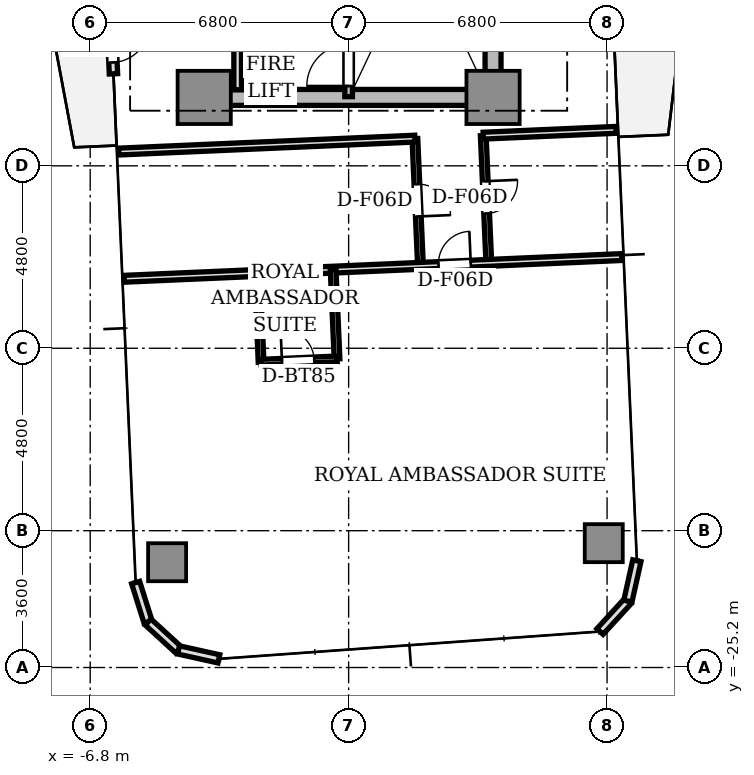
"""IFC4 building model, lengths in metres.
Left out: names, types, materials, properties, quantities, classifications, styles, units other than length and angle.
Written with IfcOpenShell. Run it as: python <this file> out.ifc"""

import sys

from ifc_helpers import new_model, si_unit, direction, frame, frame_2d, origin, origin_2d, place, context, subcontext, project, spatial, rectangle, extrude, source, transform, mapped, element, fill, save


model = new_model("IFC4")
c1 = context("Model", 3, precision=1e-05, world=origin(), true_north=direction((0.0, 1.0)))
c2 = subcontext(c1, "Body", "Model", "MODEL_VIEW")
j1 = project(units=[si_unit("LENGTHUNIT", "METRE"), si_unit("PLANEANGLEUNIT", "RADIAN")], contexts=[c1])
p1 = place(None, origin())
s1 = spatial("IfcSite", under=j1, at=p1, CompositionType="ELEMENT")
p2 = place(p1, origin())
s2 = spatial("IfcBuilding", under=s1, at=p2, CompositionType="ELEMENT")
p3 = place(p2, frame((0.0, 0.0, 118.15)))
s3 = spatial("IfcBuildingStorey", under=s2, at=p3, CompositionType="ELEMENT", Elevation=118.15)
p4 = place(p3, frame((-3.55, -10.2, 0.0), z_axis=(0.0, 0.0, 1.0), x_axis=(1.0, 0.0, 0.0)))
e1 = element("IfcWall", 1, at=p4, inside=s3, PredefinedType="SHEAR", context=c2, shape_type="SweptSolid", body=[
    extrude(rectangle(XDim=7.1, YDim=0.42, at=frame_2d((3.55, 0.0))), origin(), (0.0, 0.0, 1.0), 3.11),
])
p5 = place(p3, frame((3.8, -9.75, 0.0), z_axis=(0.0, 0.0, 1.0), x_axis=(0.0, 1.0, 0.0)))
e2 = element("IfcWall", 2, at=p5, inside=s3, PredefinedType="SHEAR", context=c2, shape_type="SweptSolid", body=[
    extrude(rectangle(XDim=6.9, YDim=0.42, at=frame_2d((3.45, 0.0))), origin(), (0.0, 0.0, 1.0), 3.11),
])
m1 = source(origin(), c2, "Body", "SweptSolid", [
    extrude(rectangle(XDim=1.4, YDim=1.4, at=origin_2d()), origin(), (0.0, 0.0, 1.0), 3.11),
])
for number, where, z_axis, x_axis in (
    (3, (-3.8, -10.2, 0.0), (0.0, 0.0, 1.0), (1.0, 0.0, 0.0)),
    (4, (3.8, -10.2, 0.0), (0.0, 0.0, 1.0), (1.0, 0.0, 0.0)),
):
    element("IfcColumn", number, at=place(p3, frame(where, z_axis=z_axis, x_axis=x_axis)), inside=s3, PredefinedType="COLUMN", context=c2, shape_type="MappedRepresentation", body=[
        mapped(m1, transform((0.0, 0.0, 0.0), scale=1.0)),
    ])
m2 = source(origin(), c2, "Body", "SweptSolid", [
    extrude(rectangle(XDim=1.0, YDim=1.0, at=origin_2d()), origin(), (0.0, 0.0, 1.0), 3.11),
])
for number, where, z_axis, x_axis in (
    (5, (-4.776, -22.43, 0.0), (0.0, 0.0, 1.0), (1.0, 0.0, 0.0)),
    (6, (6.713, -21.928, 0.0), (0.0, 0.0, 1.0), (1.0, 0.0, 0.0)),
):
    element("IfcColumn", number, at=place(p3, frame(where, z_axis=z_axis, x_axis=x_axis)), inside=s3, PredefinedType="COLUMN", context=c2, shape_type="MappedRepresentation", body=[
        mapped(m2, transform((0.0, 0.0, 0.0), scale=1.0)),
    ])
p6 = place(p3, frame((-6.306, -6.882, 0.0), z_axis=(0.0, 0.0, 1.0), x_axis=(0.043672655174, -0.999045894436, 0.0)))
e7 = element("IfcWall", 7, at=p6, inside=s3, PredefinedType="STANDARD", context=c2, shape_type="SweptSolid", body=[
    extrude(rectangle(XDim=2.7, YDim=0.22, at=frame_2d((1.35, 0.0))), origin(), (0.0, 0.0, 1.0), 3.11),
])
p7 = place(p6, frame((1.4, 0.0, 0.0)))
e8 = element("IfcOpeningElement", 8, at=p7, cuts=e7, PredefinedType="OPENING", context=c2, shape_type="SweptSolid", body=[
    extrude(rectangle(XDim=1.0, YDim=2.2, at=frame_2d((0.5, 1.1))), frame((0.0, 0.12, 0.0), z_axis=(0.0, -1.0, 0.0), x_axis=(1.0, 0.0, 0.0)), (0.0, 0.0, 1.0), 0.24),
])
p8 = place(p3, frame((-5.604, -22.966, 0.0), z_axis=(0.0, 0.0, 1.0), x_axis=(0.300755105707, -0.953701403161, 0.0)))
e9 = element("IfcWall", 9, at=p8, inside=s3, PredefinedType="STANDARD", context=c2, shape_type="SweptSolid", body=[
    extrude(rectangle(XDim=1.087, YDim=0.22, at=frame_2d((0.543, 0.0))), origin(), (0.0, 0.0, 1.0), 3.11),
])
p9 = place(p3, frame((-5.277, -24.003, 0.0), z_axis=(0.0, 0.0, 1.0), x_axis=(0.737312600672, -0.675551721847, 0.0)))
e10 = element("IfcWall", 10, at=p9, inside=s3, PredefinedType="STANDARD", context=c2, shape_type="SweptSolid", body=[
    extrude(rectangle(XDim=1.087, YDim=0.22, at=frame_2d((0.543, 0.0))), origin(), (0.0, 0.0, 1.0), 3.11),
])
for number, where, z_axis, x_axis in (
    (11, (-4.475, -24.737, 0.0), (0.0, 0.0, 1.0), (0.976, -0.217, 0.0)),
    (12, (6.614, -24.253, 0.0), (0.0, 0.0, 1.0), (0.676, 0.737, 0.0)),
):
    element("IfcWall", number, at=place(p3, frame(where, z_axis=z_axis, x_axis=x_axis)), inside=s3, PredefinedType="STANDARD", context=c2, shape_type="SweptSolid", body=[
        extrude(rectangle(XDim=1.087, YDim=0.22, at=frame_2d((0.543, 0.0))), origin(), (0.0, 0.0, 1.0), 3.11),
    ])
p10 = place(p3, frame((7.349, -23.452, 0.0), z_axis=(0.0, 0.0, 1.0), x_axis=(0.216454939174, 0.976292609471, 0.0)))
e13 = element("IfcWall", 13, at=p10, inside=s3, PredefinedType="STANDARD", context=c2, shape_type="SweptSolid", body=[
    extrude(rectangle(XDim=1.087, YDim=0.22, at=frame_2d((0.544, 0.0))), origin(), (0.0, 0.0, 1.0), 3.11),
])
p11 = place(p3, frame((0.0, -10.18, 0.0), z_axis=(0.0, 0.0, 1.0), x_axis=(0.0, 1.0, 0.0)))
e14 = element("IfcWall", 14, at=p11, inside=s3, PredefinedType="SOLIDWALL", context=c2, shape_type="SweptSolid", body=[
    extrude(rectangle(XDim=7.68, YDim=0.2, at=frame_2d((3.84, 0.0))), origin(), (0.0, 0.0, 1.0), 3.11),
])
p12 = place(p11, frame((0.28, 0.0, 0.0)))
e15 = element("IfcOpeningElement", 15, at=p12, cuts=e14, PredefinedType="OPENING", context=c2, shape_type="SweptSolid", body=[
    extrude(rectangle(XDim=1.1, YDim=2.15, at=frame_2d((0.55, 1.075))), frame((0.0, 0.11, 0.0), z_axis=(0.0, -1.0, 0.0), x_axis=(1.0, 0.0, 0.0)), (0.0, 0.0, 1.0), 0.22),
])
p13 = place(p3, frame((-2.92, -10.0, 0.0), z_axis=(0.0, 0.0, 1.0), x_axis=(0.0, 1.0, 0.0)))
e16 = element("IfcWall", 16, at=p13, inside=s3, PredefinedType="SOLIDWALL", context=c2, shape_type="SweptSolid", body=[
    extrude(rectangle(XDim=1.44, YDim=0.2, at=frame_2d((0.72, 0.0))), origin(), (0.0, 0.0, 1.0), 2.66),
])
p14 = place(p3, frame((3.542, -11.206, 0.0), z_axis=(0.0, 0.0, 1.0), x_axis=(0.043582710367, -0.99904982226, 0.0)))
e17 = element("IfcWall", 17, at=p14, inside=s3, PredefinedType="PARTITIONING", context=c2, shape_type="SweptSolid", body=[
    extrude(rectangle(XDim=3.35, YDim=0.15, at=frame_2d((1.675, 0.0))), origin(), (0.0, 0.0, 1.0), 2.66),
])
p15 = place(p14, frame((1.2, 0.0, 0.0)))
e18 = element("IfcOpeningElement", 18, at=p15, cuts=e17, PredefinedType="OPENING", context=c2, shape_type="SweptSolid", body=[
    extrude(rectangle(XDim=0.85, YDim=2.1, at=frame_2d((0.425, 1.05))), frame((0.0, 0.085, 0.0), z_axis=(0.0, -1.0, 0.0), x_axis=(1.0, 0.0, 0.0)), (0.0, 0.0, 1.0), 0.17),
])
p16 = place(p3, frame((1.744, -11.285, 0.0), z_axis=(0.0, 0.0, 1.0), x_axis=(0.043579537274, -0.999049960678, 0.0)))
e19 = element("IfcWall", 19, at=p16, inside=s3, PredefinedType="PARTITIONING", context=c2, shape_type="SweptSolid", body=[
    extrude(rectangle(XDim=3.35, YDim=0.15, at=frame_2d((1.675, 0.0))), origin(), (0.0, 0.0, 1.0), 2.66),
])
p17 = place(p16, frame((1.2, 0.0, 0.0)))
e20 = element("IfcOpeningElement", 20, at=p17, cuts=e19, PredefinedType="OPENING", context=c2, shape_type="SweptSolid", body=[
    extrude(rectangle(XDim=0.85, YDim=2.1, at=frame_2d((0.425, 1.05))), frame((0.0, 0.085, 0.0), z_axis=(0.0, -1.0, 0.0), x_axis=(1.0, 0.0, 0.0)), (0.0, 0.0, 1.0), 0.17),
])
p18 = place(p3, frame((3.542, -11.206, 0.0), z_axis=(0.0, 0.0, 1.0), x_axis=(0.999046129111, 0.04366728647, 0.0)))
e21 = element("IfcWall", 21, at=p18, inside=s3, PredefinedType="PARTITIONING", context=c2, shape_type="SweptSolid", body=[
    extrude(rectangle(XDim=3.5, YDim=0.18, at=frame_2d((1.75, 0.0))), origin(), (0.0, 0.0, 1.0), 2.66),
])
p19 = place(p3, frame((-6.049, -11.625, 0.0), z_axis=(0.0, 0.0, 1.0), x_axis=(0.999047634936, 0.043632821702, 0.0)))
e22 = element("IfcWall", 22, at=p19, inside=s3, PredefinedType="PARTITIONING", context=c2, shape_type="SweptSolid", body=[
    extrude(rectangle(XDim=7.8, YDim=0.18, at=frame_2d((3.9, 0.0))), origin(), (0.0, 0.0, 1.0), 2.66),
])
p20 = place(p3, frame((-5.903, -14.972, 0.0), z_axis=(0.0, 0.0, 1.0), x_axis=(0.999048653727, 0.043609488494, 0.0)))
e23 = element("IfcWall", 23, at=p20, inside=s3, PredefinedType="PARTITIONING", context=c2, shape_type="SweptSolid", body=[
    extrude(rectangle(XDim=13.1, YDim=0.18, at=frame_2d((6.55, 0.0))), origin(), (0.0, 0.0, 1.0), 2.66),
])
p21 = place(p20, frame((8.275, 0.0, 0.0)))
e24 = element("IfcOpeningElement", 24, at=p21, cuts=e23, PredefinedType="OPENING", context=c2, shape_type="SweptSolid", body=[
    extrude(rectangle(XDim=0.85, YDim=2.1, at=frame_2d((0.425, 1.05))), frame((0.0, 0.1, 0.0), z_axis=(0.0, -1.0, 0.0), x_axis=(1.0, 0.0, 0.0)), (0.0, 0.0, 1.0), 0.2),
])
p22 = place(p3, frame((-0.408, -14.732, 0.0), z_axis=(0.0, 0.0, 1.0), x_axis=(0.043527387554, -0.999052234136, 0.0)))
e25 = element("IfcWall", 25, at=p22, inside=s3, PredefinedType="PARTITIONING", context=c2, shape_type="SweptSolid", body=[
    extrude(rectangle(XDim=2.35, YDim=0.15, at=frame_2d((1.175, 0.0))), origin(), (0.0, 0.0, 1.0), 2.66),
])
p23 = place(p3, frame((-2.406, -14.819, 0.0), z_axis=(0.0, 0.0, 1.0), x_axis=(0.04363560271, -0.999047513473, 0.0)))
e26 = element("IfcWall", 26, at=p23, inside=s3, PredefinedType="PARTITIONING", context=c2, shape_type="SweptSolid", body=[
    extrude(rectangle(XDim=2.35, YDim=0.15, at=frame_2d((1.175, 0.0))), origin(), (0.0, 0.0, 1.0), 2.66),
])
p24 = place(p3, frame((-2.303, -17.167, 0.0), z_axis=(0.0, 0.0, 1.0), x_axis=(0.999049929275, 0.043580257179, 0.0)))
e27 = element("IfcWall", 27, at=p24, inside=s3, PredefinedType="PARTITIONING", context=c2, shape_type="SweptSolid", body=[
    extrude(rectangle(XDim=2.0, YDim=0.15, at=frame_2d((1.0, 0.0))), origin(), (0.0, 0.0, 1.0), 2.66),
])
p25 = place(p24, frame((0.55, 0.0, 0.0)))
e28 = element("IfcOpeningElement", 28, at=p25, cuts=e27, PredefinedType="OPENING", context=c2, shape_type="SweptSolid", body=[
    extrude(rectangle(XDim=0.85, YDim=2.1, at=frame_2d((0.425, 1.05))), frame((0.0, 0.085, 0.0), z_axis=(0.0, -1.0, 0.0), x_axis=(1.0, 0.0, 0.0)), (0.0, 0.0, 1.0), 0.17),
])
m3 = source(origin(), c2, "Body", "SweptSolid", [
    extrude(rectangle(XDim=1.0, YDim=0.05, at=origin_2d()), origin(), (0.0, 0.0, 1.0), 2.2),
])
p26 = place(p7, frame((0.5, 0.0, 0.0)))
e29 = element("IfcDoor", 29, at=p26, inside=s3, OperationType="SINGLE_SWING_LEFT", PredefinedType="DOOR", context=c2, shape_type="MappedRepresentation", body=[
    mapped(m3, transform((0.0, 0.0, 0.0), scale=1.0)),
])
fill(e8, e29)
m4 = source(origin(), c2, "Body", "SweptSolid", [
    extrude(rectangle(XDim=1.1, YDim=0.05, at=origin_2d()), origin(), (0.0, 0.0, 1.0), 2.15),
])
p27 = place(p12, frame((0.55, 0.0, 0.0)))
e30 = element("IfcDoor", 30, at=p27, inside=s3, OperationType="SINGLE_SWING_LEFT", PredefinedType="DOOR", context=c2, shape_type="MappedRepresentation", body=[
    mapped(m4, transform((0.0, 0.0, 0.0), scale=1.0)),
])
fill(e15, e30)
m5 = source(origin(), c2, "Body", "SweptSolid", [
    extrude(rectangle(XDim=0.85, YDim=0.05, at=origin_2d()), origin(), (0.0, 0.0, 1.0), 2.1),
])
p28 = place(p15, frame((0.425, 0.0, 0.0)))
e31 = element("IfcDoor", 31, at=p28, inside=s3, OperationType="SINGLE_SWING_LEFT", PredefinedType="DOOR", context=c2, shape_type="MappedRepresentation", body=[
    mapped(m5, transform((0.0, 0.0, 0.0), scale=1.0)),
])
fill(e18, e31)
p29 = place(p17, frame((0.425, 0.0, 0.0)))
e32 = element("IfcDoor", 32, at=p29, inside=s3, OperationType="SINGLE_SWING_RIGHT", PredefinedType="DOOR", context=c2, shape_type="MappedRepresentation", body=[
    mapped(m5, transform((0.0, 0.0, 0.0), scale=1.0)),
])
fill(e20, e32)
p30 = place(p25, frame((0.425, 0.0, 0.0)))
e33 = element("IfcDoor", 33, at=p30, inside=s3, OperationType="SINGLE_SWING_LEFT", PredefinedType="DOOR", context=c2, shape_type="MappedRepresentation", body=[
    mapped(m5, transform((0.0, 0.0, 0.0), scale=1.0)),
])
fill(e28, e33)
p31 = place(p21, frame((0.425, 0.0, 0.0)))
e34 = element("IfcDoor", 34, at=p31, inside=s3, OperationType="SINGLE_SWING_RIGHT", PredefinedType="DOOR", context=c2, shape_type="MappedRepresentation", body=[
    mapped(m5, transform((0.0, 0.0, 0.0), scale=1.0)),
])
fill(e24, e34)
save(model, sys.argv[1])
